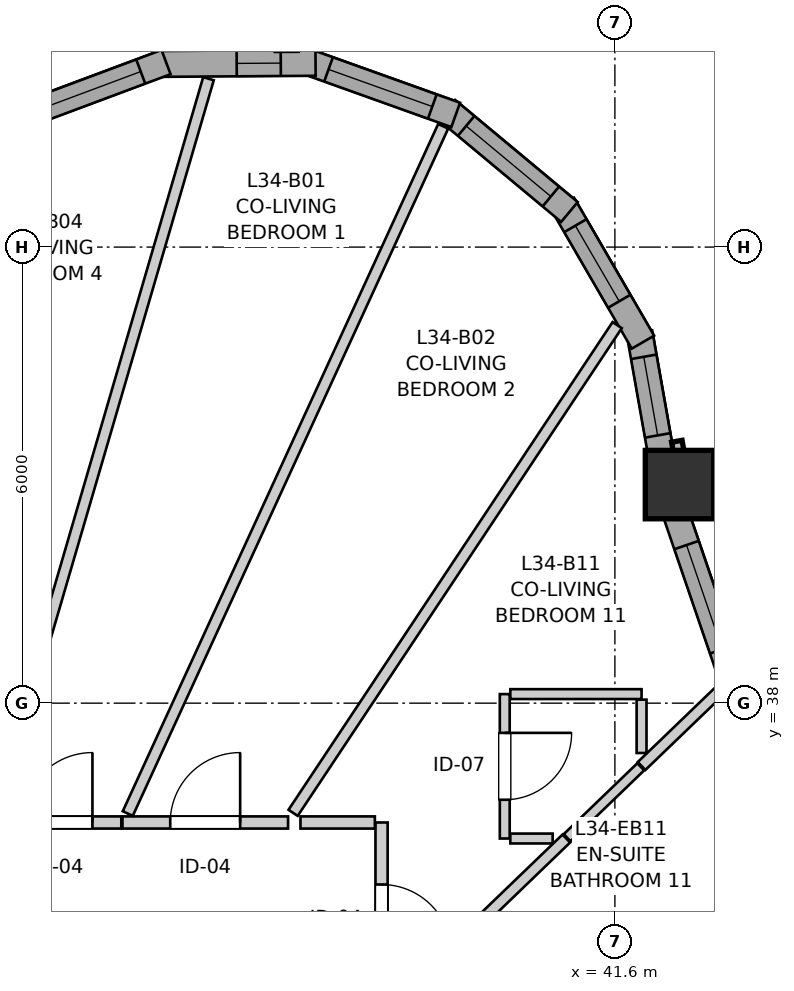
"""IFC4 building model, lengths in metres.
Left out: names, types, materials, properties, quantities, classifications, styles, units other than length and angle.
Written with IfcOpenShell. Run it as: python <this file> out.ifc"""

import sys

from ifc_helpers import new_model, si_unit, direction, frame, frame_2d, origin, origin_2d, place, context, subcontext, project, spatial, rectangle, extrude, source, transform, mapped, element, fill, save


model = new_model("IFC4")
c1 = context("Model", 3, precision=1e-05, world=origin(), true_north=direction((0.0, 1.0)))
c2 = subcontext(c1, "Body", "Model", "MODEL_VIEW")
j1 = project(units=[si_unit("LENGTHUNIT", "METRE"), si_unit("PLANEANGLEUNIT", "RADIAN")], contexts=[c1])
p1 = place(None, origin())
s1 = spatial("IfcSite", under=j1, at=p1, CompositionType="ELEMENT")
p2 = place(p1, origin())
s2 = spatial("IfcBuilding", under=s1, at=p2, CompositionType="ELEMENT")
p3 = place(p2, frame((0.0, 0.0, 115.2)))
s3 = spatial("IfcBuildingStorey", under=s2, at=p3, CompositionType="ELEMENT", Elevation=115.2)
m1 = source(origin(), c2, "Body", "SweptSolid", [
    extrude(rectangle(XDim=0.9, YDim=0.9, at=origin_2d()), origin(), (0.0, 0.0, 1.0), 2.95),
])
p4 = place(p3, frame((42.45, 40.875, 0.0), z_axis=(0.0, 0.0, 1.0), x_axis=(1.0, 0.0, 0.0)))
e1 = element("IfcColumn", 1, at=p4, inside=s3, PredefinedType="COLUMN", context=c2, shape_type="MappedRepresentation", body=[
    mapped(m1, transform((0.0, 0.0, 0.0), x_axis=(1.0, 0.0, 0.0), y_axis=(0.0, 1.0, 0.0), z_axis=(0.0, 0.0, 1.0), scale=1.0)),
])
p5 = place(p3, frame((43.319, 37.809, 0.0), z_axis=(0.0, 0.0, 1.0), x_axis=(-0.323586371726, 0.946198636669, 0.0)))
e2 = element("IfcWall", 2, at=p5, inside=s3, PredefinedType="SOLIDWALL", context=c2, shape_type="SweptSolid", body=[
    extrude(rectangle(XDim=2.952, YDim=0.34, at=frame_2d((1.476, 0.0))), origin(), (0.0, 0.0, 1.0), 2.48),
])
p6 = place(p5, frame((0.949, 0.0, 0.82)))
e3 = element("IfcOpeningElement", 3, at=p6, cuts=e2, PredefinedType="OPENING", context=c2, shape_type="SweptSolid", body=[
    extrude(rectangle(XDim=1.45, YDim=1.25, at=frame_2d((0.725, 0.625))), frame((0.0, 0.18, 0.0), z_axis=(0.0, -1.0, 0.0), x_axis=(1.0, 0.0, 0.0)), (0.0, 0.0, 1.0), 0.36),
])
p7 = place(p3, frame((42.242, 41.072, 0.0), z_axis=(0.0, 0.0, 1.0), x_axis=(-0.17440141227, 0.984674640375, 0.0)))
e4 = element("IfcWall", 4, at=p7, inside=s3, PredefinedType="SOLIDWALL", context=c2, shape_type="SweptSolid", body=[
    extrude(rectangle(XDim=1.831, YDim=0.34, at=frame_2d((0.916, 0.0))), origin(), (0.0, 0.0, 1.0), 2.48),
])
p8 = place(p7, frame((0.457, 0.0, 0.82)))
e5 = element("IfcOpeningElement", 5, at=p8, cuts=e4, PredefinedType="OPENING", context=c2, shape_type="SweptSolid", body=[
    extrude(rectangle(XDim=1.05, YDim=1.45, at=frame_2d((0.525, 0.725))), frame((0.0, 0.18, 0.0), z_axis=(0.0, -1.0, 0.0), x_axis=(1.0, 0.0, 0.0)), (0.0, 0.0, 1.0), 0.36),
])
p9 = place(p3, frame((41.969, 42.749, 0.0), z_axis=(0.0, 0.0, 1.0), x_axis=(-0.501989603552, 0.864873654313, 0.0)))
e6 = element("IfcWall", 6, at=p9, inside=s3, PredefinedType="SOLIDWALL", context=c2, shape_type="SweptSolid", body=[
    extrude(rectangle(XDim=2.099, YDim=0.34, at=frame_2d((1.05, 0.0))), origin(), (0.0, 0.0, 1.0), 2.48),
])
p10 = place(p9, frame((0.622, 0.0, 0.82)))
e7 = element("IfcOpeningElement", 7, at=p10, cuts=e6, PredefinedType="OPENING", context=c2, shape_type="SweptSolid", body=[
    extrude(rectangle(XDim=1.15, YDim=1.2, at=frame_2d((0.575, 0.6))), frame((0.0, 0.18, 0.0), z_axis=(0.0, -1.0, 0.0), x_axis=(1.0, 0.0, 0.0)), (0.0, 0.0, 1.0), 0.36),
])
p11 = place(p3, frame((41.002, 44.462, 0.0), z_axis=(0.0, 0.0, 1.0), x_axis=(-0.768488123124, 0.639864051669, 0.0)))
e8 = element("IfcWall", 8, at=p11, inside=s3, PredefinedType="SOLIDWALL", context=c2, shape_type="SweptSolid", body=[
    extrude(rectangle(XDim=2.099, YDim=0.34, at=frame_2d((1.05, 0.0))), origin(), (0.0, 0.0, 1.0), 2.48),
])
p12 = place(p11, frame((0.319, 0.0, 0.82)))
e9 = element("IfcOpeningElement", 9, at=p12, cuts=e8, PredefinedType="OPENING", context=c2, shape_type="SweptSolid", body=[
    extrude(rectangle(XDim=1.45, YDim=1.25, at=frame_2d((0.725, 0.625))), frame((0.0, 0.18, 0.0), z_axis=(0.0, -1.0, 0.0), x_axis=(1.0, 0.0, 0.0)), (0.0, 0.0, 1.0), 0.36),
])
p13 = place(p3, frame((39.506, 45.739, 0.0), z_axis=(0.0, 0.0, 1.0), x_axis=(-0.941486401639, 0.33705096874, 0.0)))
e10 = element("IfcWall", 10, at=p13, inside=s3, PredefinedType="SOLIDWALL", context=c2, shape_type="SweptSolid", body=[
    extrude(rectangle(XDim=2.099, YDim=0.34, at=frame_2d((1.05, 0.0))), origin(), (0.0, 0.0, 1.0), 2.48),
])
p14 = place(p13, frame((0.327, 0.0, 0.82)))
e11 = element("IfcOpeningElement", 11, at=p14, cuts=e10, PredefinedType="OPENING", context=c2, shape_type="SweptSolid", body=[
    extrude(rectangle(XDim=1.45, YDim=1.25, at=frame_2d((0.725, 0.625))), frame((0.0, 0.18, 0.0), z_axis=(0.0, -1.0, 0.0), x_axis=(1.0, 0.0, 0.0)), (0.0, 0.0, 1.0), 0.36),
])
p15 = place(p3, frame((37.662, 46.424, 0.0), z_axis=(0.0, 0.0, 1.0), x_axis=(-0.999976456891, -0.00686189939, 0.0)))
e12 = element("IfcWall", 12, at=p15, inside=s3, PredefinedType="SOLIDWALL", context=c2, shape_type="SweptSolid", body=[
    extrude(rectangle(XDim=2.099, YDim=0.34, at=frame_2d((1.05, 0.0))), origin(), (0.0, 0.0, 1.0), 2.48),
])
p16 = place(p15, frame((0.458, 0.0, 0.82)))
e13 = element("IfcOpeningElement", 13, at=p16, cuts=e12, PredefinedType="OPENING", context=c2, shape_type="SweptSolid", body=[
    extrude(rectangle(XDim=0.58, YDim=1.35, at=frame_2d((0.29, 0.675))), frame((0.0, 0.18, 0.0), z_axis=(0.0, -1.0, 0.0), x_axis=(1.0, 0.0, 0.0)), (0.0, 0.0, 1.0), 0.36),
])
p17 = place(p3, frame((35.695, 46.434, 0.0), z_axis=(0.0, 0.0, 1.0), x_axis=(-0.9368002254, -0.349864741994, 0.0)))
e14 = element("IfcWall", 14, at=p17, inside=s3, PredefinedType="SOLIDWALL", context=c2, shape_type="SweptSolid", body=[
    extrude(rectangle(XDim=2.041, YDim=0.34, at=frame_2d((1.021, 0.0))), origin(), (0.0, 0.0, 1.0), 2.48),
])
p18 = place(p17, frame((0.355, 0.0, 0.82)))
e15 = element("IfcOpeningElement", 15, at=p18, cuts=e14, PredefinedType="OPENING", context=c2, shape_type="SweptSolid", body=[
    extrude(rectangle(XDim=1.35, YDim=1.45, at=frame_2d((0.675, 0.725))), frame((0.0, 0.18, 0.0), z_axis=(0.0, -1.0, 0.0), x_axis=(1.0, 0.0, 0.0)), (0.0, 0.0, 1.0), 0.36),
])
p19 = place(p3, frame((38.53, 36.43, 0.0), z_axis=(0.0, 0.0, 1.0), x_axis=(0.0, -1.0, 0.0)))
e16 = element("IfcWall", 16, at=p19, inside=s3, PredefinedType="PARTITIONING", context=c2, shape_type="SweptSolid", body=[
    extrude(rectangle(XDim=2.516, YDim=0.16, at=frame_2d((1.258, 0.0))), origin(), (0.0, 0.0, 1.0), 2.588),
])
p20 = place(p19, frame((0.816, 0.0, 0.0)))
e17 = element("IfcOpeningElement", 17, at=p20, cuts=e16, PredefinedType="OPENING", context=c2, shape_type="SweptSolid", body=[
    extrude(rectangle(XDim=0.92, YDim=2.1, at=frame_2d((0.46, 1.05))), frame((0.0, 0.09, 0.0), z_axis=(0.0, -1.0, 0.0), x_axis=(1.0, 0.0, 0.0)), (0.0, 0.0, 1.0), 0.18),
])
p21 = place(p3, frame((35.121, 36.43, 0.0), z_axis=(0.0, 0.0, 1.0), x_axis=(1.0, 0.0, 0.0)))
e18 = element("IfcWall", 18, at=p21, inside=s3, PredefinedType="PARTITIONING", context=c2, shape_type="SweptSolid", body=[
    extrude(rectangle(XDim=2.179, YDim=0.16, at=frame_2d((1.089, 0.0))), origin(), (0.0, 0.0, 1.0), 2.588),
])
p22 = place(p21, frame((0.628, 0.0, 0.0)))
e19 = element("IfcOpeningElement", 19, at=p22, cuts=e18, PredefinedType="OPENING", context=c2, shape_type="SweptSolid", body=[
    extrude(rectangle(XDim=0.92, YDim=2.1, at=frame_2d((0.46, 1.05))), frame((0.0, 0.09, 0.0), z_axis=(0.0, -1.0, 0.0), x_axis=(1.0, 0.0, 0.0)), (0.0, 0.0, 1.0), 0.18),
])
p23 = place(p3, frame((40.151, 38.119, 0.0), z_axis=(0.0, 0.0, 1.0), x_axis=(0.0, -1.0, 0.0)))
e20 = element("IfcWall", 20, at=p23, inside=s3, PredefinedType="PARTITIONING", context=c2, shape_type="SweptSolid", body=[
    extrude(rectangle(XDim=1.9, YDim=0.13, at=frame_2d((0.95, 0.0))), origin(), (0.0, 0.0, 1.0), 2.95),
])
p24 = place(p23, frame((0.51, 0.0, 0.0)))
e21 = element("IfcOpeningElement", 21, at=p24, cuts=e20, PredefinedType="OPENING", context=c2, shape_type="SweptSolid", body=[
    extrude(rectangle(XDim=0.88, YDim=2.05, at=frame_2d((0.44, 1.025))), frame((0.0, 0.075, 0.0), z_axis=(0.0, -1.0, 0.0), x_axis=(1.0, 0.0, 0.0)), (0.0, 0.0, 1.0), 0.15),
])
p25 = place(p3, frame((33.426, 36.43, 0.0), z_axis=(0.0, 0.0, 1.0), x_axis=(1.0, 0.0, 0.0)))
e22 = element("IfcWall", 22, at=p25, inside=s3, PredefinedType="PARTITIONING", context=c2, shape_type="SweptSolid", body=[
    extrude(rectangle(XDim=1.68, YDim=0.16, at=frame_2d((0.84, 0.0))), origin(), (0.0, 0.0, 1.0), 2.95),
])
p26 = place(p25, frame((0.38, 0.0, 0.0)))
e23 = element("IfcOpeningElement", 23, at=p26, cuts=e22, PredefinedType="OPENING", context=c2, shape_type="SweptSolid", body=[
    extrude(rectangle(XDim=0.92, YDim=2.1, at=frame_2d((0.46, 1.05))), frame((0.0, 0.09, 0.0), z_axis=(0.0, -1.0, 0.0), x_axis=(1.0, 0.0, 0.0)), (0.0, 0.0, 1.0), 0.18),
])
p27 = place(p3, frame((33.427, 36.538, 0.0), z_axis=(0.0, 0.0, 1.0), x_axis=(0.280326379037, 0.959904745908, 0.0)))
e24 = element("IfcWall", 24, at=p27, inside=s3, PredefinedType="PARTITIONING", context=c2, shape_type="SweptSolid", body=[
    extrude(rectangle(XDim=10.082, YDim=0.145, at=frame_2d((5.041, 0.0))), origin(), (0.0, 0.0, 1.0), 2.95),
])
p28 = place(p3, frame((35.191, 36.548, 0.0), z_axis=(0.0, 0.0, 1.0), x_axis=(0.417154036681, 0.908835799075, 0.0)))
e25 = element("IfcWall", 25, at=p28, inside=s3, PredefinedType="PARTITIONING", context=c2, shape_type="SweptSolid", body=[
    extrude(rectangle(XDim=9.949, YDim=0.145, at=frame_2d((4.974, 0.0))), origin(), (0.0, 0.0, 1.0), 2.95),
])
p29 = place(p3, frame((37.366, 36.557, 0.0), z_axis=(0.0, 0.0, 1.0), x_axis=(0.553463679146, 0.832873313215, 0.0)))
e26 = element("IfcWall", 26, at=p29, inside=s3, PredefinedType="PARTITIONING", context=c2, shape_type="SweptSolid", body=[
    extrude(rectangle(XDim=7.704, YDim=0.145, at=frame_2d((3.852, 0.0))), origin(), (0.0, 0.0, 1.0), 2.95),
])
p30 = place(p3, frame((38.666, 34.009, 0.0), z_axis=(0.0, 0.0, 1.0), x_axis=(0.72031454127, 0.693647577402, 0.0)))
e27 = element("IfcWall", 27, at=p30, inside=s3, PredefinedType="PARTITIONING", context=c2, shape_type="SweptSolid", body=[
    extrude(rectangle(XDim=3.186, YDim=0.145, at=frame_2d((1.593, 0.0))), origin(), (0.0, 0.0, 1.0), 2.95),
])
p31 = place(p3, frame((40.224, 38.119, 0.0), z_axis=(0.0, 0.0, 1.0), x_axis=(1.0, 0.0, 0.0)))
e28 = element("IfcWall", 28, at=p31, inside=s3, PredefinedType="PARTITIONING", context=c2, shape_type="SweptSolid", body=[
    extrude(rectangle(XDim=1.727, YDim=0.13, at=frame_2d((0.863, 0.0))), origin(), (0.0, 0.0, 1.0), 2.95),
])
p32 = place(p3, frame((41.951, 37.173, 0.0), z_axis=(0.0, 0.0, 1.0), x_axis=(0.720559112487, 0.693393514111, 0.0)))
e29 = element("IfcWall", 29, at=p32, inside=s3, PredefinedType="PARTITIONING", context=c2, shape_type="SweptSolid", body=[
    extrude(rectangle(XDim=1.456, YDim=0.145, at=frame_2d((0.728, 0.0))), origin(), (0.0, 0.0, 1.0), 2.95),
])
p33 = place(p3, frame((40.972, 36.229, 0.0), z_axis=(0.0, 0.0, 1.0), x_axis=(0.72014550452, 0.693823069896, 0.0)))
e30 = element("IfcWall", 30, at=p33, inside=s3, PredefinedType="PARTITIONING", context=c2, shape_type="SweptSolid", body=[
    extrude(rectangle(XDim=1.345, YDim=0.13, at=frame_2d((0.672, 0.0))), origin(), (0.0, 0.0, 1.0), 2.95),
])
p34 = place(p3, frame((37.463, 36.43, 0.0), z_axis=(0.0, 0.0, 1.0), x_axis=(1.0, 0.0, 0.0)))
e31 = element("IfcWall", 31, at=p34, inside=s3, PredefinedType="PARTITIONING", context=c2, shape_type="SweptSolid", body=[
    extrude(rectangle(XDim=0.979, YDim=0.16, at=frame_2d((0.489, 0.0))), origin(), (0.0, 0.0, 1.0), 2.588),
])
p35 = place(p3, frame((41.951, 37.344, 0.0), z_axis=(0.0, 0.0, 1.0), x_axis=(0.0, 1.0, 0.0)))
e32 = element("IfcWall", 32, at=p35, inside=s3, PredefinedType="PARTITIONING", context=c2, shape_type="SweptSolid", body=[
    extrude(rectangle(XDim=0.702, YDim=0.13, at=frame_2d((0.351, 0.0))), origin(), (0.0, 0.0, 1.0), 2.95),
])
p36 = place(p3, frame((40.224, 36.219, 0.0), z_axis=(0.0, 0.0, 1.0), x_axis=(1.0, 0.0, 0.0)))
e33 = element("IfcWall", 33, at=p36, inside=s3, PredefinedType="PARTITIONING", context=c2, shape_type="SweptSolid", body=[
    extrude(rectangle(XDim=0.557, YDim=0.13, at=frame_2d((0.278, 0.0))), origin(), (0.0, 0.0, 1.0), 2.95),
])
m2 = source(origin(), c2, "Body", "SweptSolid", [
    extrude(rectangle(XDim=1.45, YDim=1.25, at=frame_2d((0.725, 0.625))), frame((0.0, 0.03, 0.0), z_axis=(0.0, -1.0, 0.0), x_axis=(1.0, 0.0, 0.0)), (0.0, 0.0, 1.0), 0.06),
])
p37 = place(p6, origin())
e34 = element("IfcWindow", 34, at=p37, inside=s3, PartitioningType="SINGLE_PANEL", PredefinedType="WINDOW", context=c2, shape_type="MappedRepresentation", body=[
    mapped(m2, transform((0.0, 0.0, 0.0), x_axis=(1.0, 0.0, 0.0), y_axis=(0.0, 1.0, 0.0), z_axis=(0.0, 0.0, 1.0), scale=1.0)),
])
fill(e3, e34)
m3 = source(origin(), c2, "Body", "SweptSolid", [
    extrude(rectangle(XDim=1.05, YDim=1.45, at=frame_2d((0.525, 0.725))), frame((0.0, 0.03, 0.0), z_axis=(0.0, -1.0, 0.0), x_axis=(1.0, 0.0, 0.0)), (0.0, 0.0, 1.0), 0.06),
])
p38 = place(p8, origin())
e35 = element("IfcWindow", 35, at=p38, inside=s3, PartitioningType="SINGLE_PANEL", PredefinedType="WINDOW", context=c2, shape_type="MappedRepresentation", body=[
    mapped(m3, transform((0.0, 0.0, 0.0), x_axis=(1.0, 0.0, 0.0), y_axis=(0.0, 1.0, 0.0), z_axis=(0.0, 0.0, 1.0), scale=1.0)),
])
fill(e5, e35)
m4 = source(origin(), c2, "Body", "SweptSolid", [
    extrude(rectangle(XDim=1.15, YDim=1.2, at=frame_2d((0.575, 0.6))), frame((0.0, 0.03, 0.0), z_axis=(0.0, -1.0, 0.0), x_axis=(1.0, 0.0, 0.0)), (0.0, 0.0, 1.0), 0.06),
])
p39 = place(p10, origin())
e36 = element("IfcWindow", 36, at=p39, inside=s3, PartitioningType="SINGLE_PANEL", PredefinedType="WINDOW", context=c2, shape_type="MappedRepresentation", body=[
    mapped(m4, transform((0.0, 0.0, 0.0), x_axis=(1.0, 0.0, 0.0), y_axis=(0.0, 1.0, 0.0), z_axis=(0.0, 0.0, 1.0), scale=1.0)),
])
fill(e7, e36)
p40 = place(p12, origin())
e37 = element("IfcWindow", 37, at=p40, inside=s3, PartitioningType="SINGLE_PANEL", PredefinedType="WINDOW", context=c2, shape_type="MappedRepresentation", body=[
    mapped(m2, transform((0.0, 0.0, 0.0), x_axis=(1.0, 0.0, 0.0), y_axis=(0.0, 1.0, 0.0), z_axis=(0.0, 0.0, 1.0), scale=1.0)),
])
fill(e9, e37)
p41 = place(p14, origin())
e38 = element("IfcWindow", 38, at=p41, inside=s3, PartitioningType="SINGLE_PANEL", PredefinedType="WINDOW", context=c2, shape_type="MappedRepresentation", body=[
    mapped(m2, transform((0.0, 0.0, 0.0), x_axis=(1.0, 0.0, 0.0), y_axis=(0.0, 1.0, 0.0), z_axis=(0.0, 0.0, 1.0), scale=1.0)),
])
fill(e11, e38)
m5 = source(origin(), c2, "Body", "SweptSolid", [
    extrude(rectangle(XDim=0.58, YDim=1.35, at=frame_2d((0.29, 0.675))), frame((0.0, 0.03, 0.0), z_axis=(0.0, -1.0, 0.0), x_axis=(1.0, 0.0, 0.0)), (0.0, 0.0, 1.0), 0.06),
])
p42 = place(p16, origin())
e39 = element("IfcWindow", 39, at=p42, inside=s3, PartitioningType="SINGLE_PANEL", PredefinedType="WINDOW", context=c2, shape_type="MappedRepresentation", body=[
    mapped(m5, transform((0.0, 0.0, 0.0), x_axis=(1.0, 0.0, 0.0), y_axis=(0.0, 1.0, 0.0), z_axis=(0.0, 0.0, 1.0), scale=1.0)),
])
fill(e13, e39)
m6 = source(origin(), c2, "Body", "SweptSolid", [
    extrude(rectangle(XDim=1.35, YDim=1.45, at=frame_2d((0.675, 0.725))), frame((0.0, 0.03, 0.0), z_axis=(0.0, -1.0, 0.0), x_axis=(1.0, 0.0, 0.0)), (0.0, 0.0, 1.0), 0.06),
])
p43 = place(p18, origin())
e40 = element("IfcWindow", 40, at=p43, inside=s3, PartitioningType="SINGLE_PANEL", PredefinedType="WINDOW", context=c2, shape_type="MappedRepresentation", body=[
    mapped(m6, transform((0.0, 0.0, 0.0), x_axis=(1.0, 0.0, 0.0), y_axis=(0.0, 1.0, 0.0), z_axis=(0.0, 0.0, 1.0), scale=1.0)),
])
fill(e15, e40)
m7 = source(origin(), c2, "Body", "SweptSolid", [
    extrude(rectangle(XDim=0.92, YDim=2.1, at=frame_2d((0.46, 1.05))), frame((0.0, 0.025, 0.0), z_axis=(0.0, -1.0, 0.0), x_axis=(1.0, 0.0, 0.0)), (0.0, 0.0, 1.0), 0.05),
])
p44 = place(p20, origin())
e41 = element("IfcDoor", 41, at=p44, inside=s3, OperationType="SINGLE_SWING_RIGHT", PredefinedType="DOOR", context=c2, shape_type="MappedRepresentation", body=[
    mapped(m7, transform((0.0, 0.0, 0.0), x_axis=(1.0, 0.0, 0.0), y_axis=(0.0, 1.0, 0.0), z_axis=(0.0, 0.0, 1.0), scale=1.0)),
])
fill(e17, e41)
p45 = place(p22, origin())
e42 = element("IfcDoor", 42, at=p45, inside=s3, OperationType="SINGLE_SWING_RIGHT", PredefinedType="DOOR", context=c2, shape_type="MappedRepresentation", body=[
    mapped(m7, transform((0.0, 0.0, 0.0), x_axis=(1.0, 0.0, 0.0), y_axis=(0.0, 1.0, 0.0), z_axis=(0.0, 0.0, 1.0), scale=1.0)),
])
fill(e19, e42)
m8 = source(origin(), c2, "Body", "SweptSolid", [
    extrude(rectangle(XDim=0.88, YDim=2.05, at=frame_2d((0.44, 1.025))), frame((0.0, 0.025, 0.0), z_axis=(0.0, -1.0, 0.0), x_axis=(1.0, 0.0, 0.0)), (0.0, 0.0, 1.0), 0.05),
])
p46 = place(p24, origin())
e43 = element("IfcDoor", 43, at=p46, inside=s3, OperationType="SINGLE_SWING_LEFT", PredefinedType="DOOR", context=c2, shape_type="MappedRepresentation", body=[
    mapped(m8, transform((0.0, 0.0, 0.0), x_axis=(1.0, 0.0, 0.0), y_axis=(0.0, 1.0, 0.0), z_axis=(0.0, 0.0, 1.0), scale=1.0)),
])
fill(e21, e43)
p47 = place(p26, origin())
e44 = element("IfcDoor", 44, at=p47, inside=s3, OperationType="SINGLE_SWING_RIGHT", PredefinedType="DOOR", context=c2, shape_type="MappedRepresentation", body=[
    mapped(m7, transform((0.0, 0.0, 0.0), x_axis=(1.0, 0.0, 0.0), y_axis=(0.0, 1.0, 0.0), z_axis=(0.0, 0.0, 1.0), scale=1.0)),
])
fill(e23, e44)
save(model, sys.argv[1])
